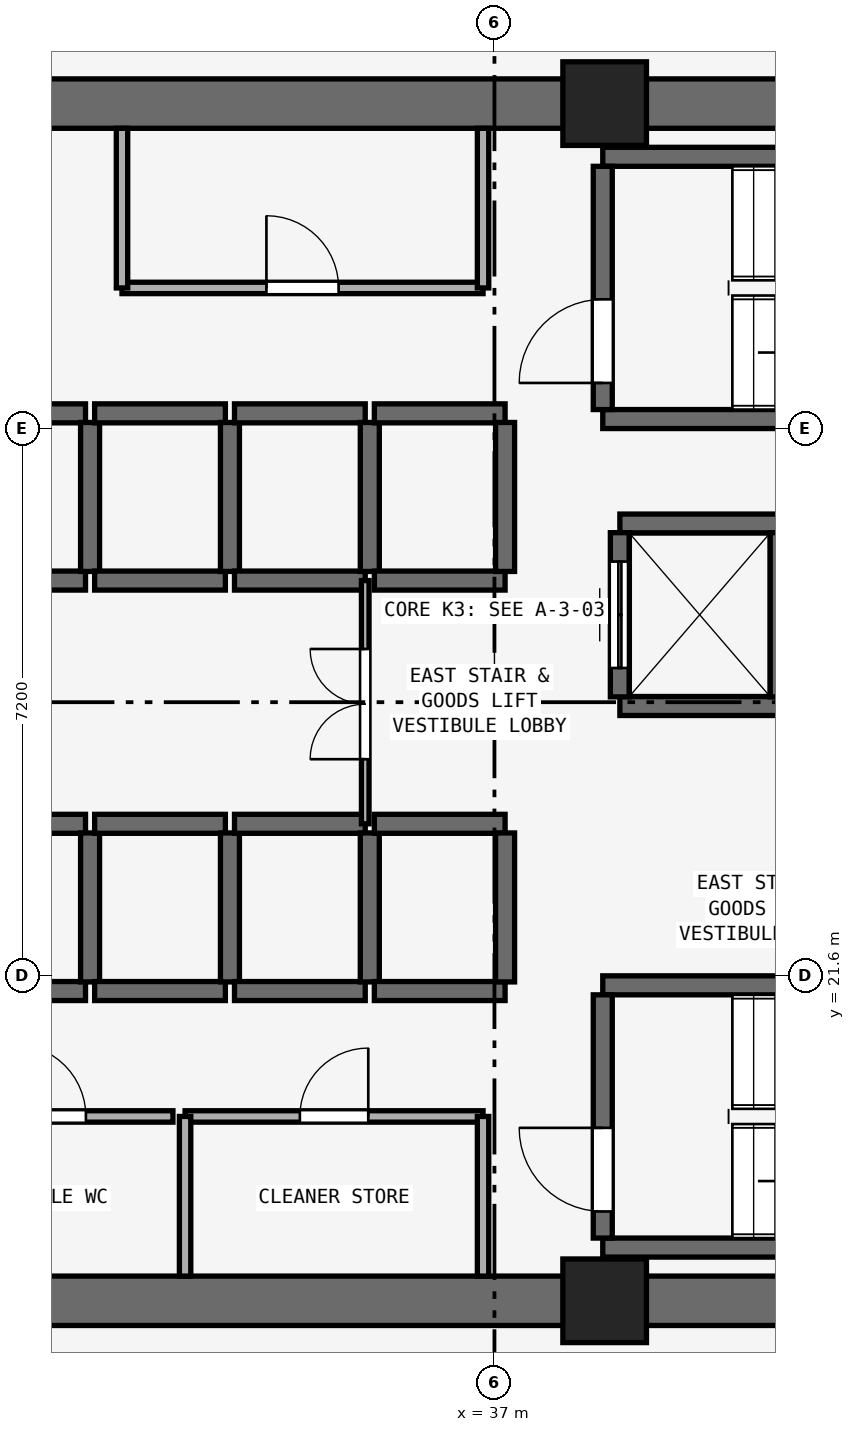
"""IFC4 building model, lengths in metres.
Left out: names, types, materials, properties, quantities, classifications, styles, units other than length and angle.
Written with IfcOpenShell. Run it as: python <this file> out.ifc"""

import sys

from ifc_helpers import new_model, si_unit, direction, frame, frame_2d, origin, origin_2d, place, context, subcontext, project, spatial, rectangle, extrude, element, fill, save


model = new_model("IFC4")
c1 = context("Model", 3, precision=1e-05, world=origin(), true_north=direction((0.0, 1.0)))
c2 = subcontext(c1, "Body", "Model", "MODEL_VIEW")
j1 = project(units=[si_unit("LENGTHUNIT", "METRE"), si_unit("PLANEANGLEUNIT", "RADIAN")], contexts=[c1])
p1 = place(None, origin())
s1 = spatial("IfcSite", under=j1, at=p1, CompositionType="ELEMENT")
p2 = place(p1, origin())
s2 = spatial("IfcBuilding", under=s1, at=p2, CompositionType="ELEMENT")
p3 = place(p2, frame((0.0, 0.0, 25.0)))
s3 = spatial("IfcBuildingStorey", under=s2, at=p3, CompositionType="ELEMENT", Elevation=25.0)
for number, where, z_axis, x_axis in (
    (1, (25.4, 17.325, 0.0), (0.0, 0.0, 1.0), (1.0, 0.0, 0.0)),
    (2, (25.4, 33.075, 0.0), (0.0, 0.0, 1.0), (1.0, 0.0, 0.0)),
):
    element("IfcWall", number, at=place(p3, frame(where, z_axis=z_axis, x_axis=x_axis)), inside=s3, PredefinedType="SHEAR", context=c2, shape_type="SweptSolid", body=[
        extrude(rectangle(XDim=23.2, YDim=0.65, at=frame_2d((11.6, 0.0))), origin(), (0.0, 0.0, 1.0), 3.525),
    ])
for number, where, z_axis, x_axis in (
    (3, (38.45, 17.325, 0.0), (0.0, 0.0, 1.0), (1.0, 0.0, 0.0)),
    (4, (38.45, 33.075, 0.0), (0.0, 0.0, 1.0), (1.0, 0.0, 0.0)),
):
    element("IfcColumn", number, at=place(p3, frame(where, z_axis=z_axis, x_axis=x_axis)), inside=s3, PredefinedType="PILASTER", context=c2, shape_type="SweptSolid", body=[
        extrude(rectangle(XDim=1.1, YDim=1.1, at=origin_2d()), origin(), (0.0, 0.0, 1.0), 3.8),
    ])
for number, where, z_axis, x_axis in (
    (5, (38.425, 28.925, 0.0), (0.0, 0.0, 1.0), (1.0, 0.0, 0.0)),
    (6, (38.425, 32.375, 0.0), (0.0, 0.0, 1.0), (1.0, 0.0, 0.0)),
):
    element("IfcWall", number, at=place(p3, frame(where, z_axis=z_axis, x_axis=x_axis)), inside=s3, PredefinedType="SHEAR", context=c2, shape_type="SweptSolid", body=[
        extrude(rectangle(XDim=7.3, YDim=0.25, at=frame_2d((3.65, 0.0))), origin(), (0.0, 0.0, 1.0), 3.525),
    ])
p4 = place(p3, frame((38.425, 29.05, 0.0), z_axis=(0.0, 0.0, 1.0), x_axis=(0.0, 1.0, 0.0)))
e7 = element("IfcWall", 7, at=p4, inside=s3, PredefinedType="SHEAR", context=c2, shape_type="SweptSolid", body=[
    extrude(rectangle(XDim=3.2, YDim=0.25, at=frame_2d((1.6, 0.0))), origin(), (0.0, 0.0, 1.0), 3.525),
])
p5 = place(p4, frame((0.35, 0.0, 0.0)))
e8 = element("IfcOpeningElement", 8, at=p5, cuts=e7, PredefinedType="OPENING", context=c2, shape_type="SweptSolid", body=[
    extrude(rectangle(XDim=1.1, YDim=2.15, at=frame_2d((0.55, 1.075))), frame((0.0, 0.135, 0.0), z_axis=(0.0, -1.0, 0.0), x_axis=(1.0, 0.0, 0.0)), (0.0, 0.0, 1.0), 0.27),
])
for number, where, z_axis, x_axis in (
    (9, (38.425, 18.025, 0.0), (0.0, 0.0, 1.0), (1.0, 0.0, 0.0)),
    (10, (38.425, 21.475, 0.0), (0.0, 0.0, 1.0), (1.0, 0.0, 0.0)),
):
    element("IfcWall", number, at=place(p3, frame(where, z_axis=z_axis, x_axis=x_axis)), inside=s3, PredefinedType="SHEAR", context=c2, shape_type="SweptSolid", body=[
        extrude(rectangle(XDim=7.3, YDim=0.25, at=frame_2d((3.65, 0.0))), origin(), (0.0, 0.0, 1.0), 3.525),
    ])
p6 = place(p3, frame((38.425, 18.15, 0.0), z_axis=(0.0, 0.0, 1.0), x_axis=(0.0, 1.0, 0.0)))
e11 = element("IfcWall", 11, at=p6, inside=s3, PredefinedType="SHEAR", context=c2, shape_type="SweptSolid", body=[
    extrude(rectangle(XDim=3.2, YDim=0.25, at=frame_2d((1.6, 0.0))), origin(), (0.0, 0.0, 1.0), 3.525),
])
p7 = place(p6, frame((0.35, 0.0, 0.0)))
e12 = element("IfcOpeningElement", 12, at=p7, cuts=e11, PredefinedType="OPENING", context=c2, shape_type="SweptSolid", body=[
    extrude(rectangle(XDim=1.1, YDim=2.15, at=frame_2d((0.55, 1.075))), frame((0.0, 0.135, 0.0), z_axis=(0.0, -1.0, 0.0), x_axis=(1.0, 0.0, 0.0)), (0.0, 0.0, 1.0), 0.27),
])
for number, where, z_axis, x_axis in (
    (13, (29.9, 21.4, 0.0), (0.0, 0.0, 1.0), (1.0, 0.0, 0.0)),
    (14, (29.9, 23.6, 0.0), (0.0, 0.0, 1.0), (1.0, 0.0, 0.0)),
):
    element("IfcWall", number, at=place(p3, frame(where, z_axis=z_axis, x_axis=x_axis)), inside=s3, PredefinedType="SHEAR", context=c2, shape_type="SweptSolid", body=[
        extrude(rectangle(XDim=1.72, YDim=0.25, at=frame_2d((0.86, 0.0))), origin(), (0.0, 0.0, 1.0), 3.525),
    ])
p8 = place(p3, frame((31.68, 21.52, 0.0), z_axis=(0.0, 0.0, 1.0), x_axis=(0.0, 1.0, 0.0)))
e15 = element("IfcWall", 15, at=p8, inside=s3, PredefinedType="SHEAR", context=c2, shape_type="SweptSolid", body=[
    extrude(rectangle(XDim=1.96, YDim=0.25, at=frame_2d((0.98, 0.0))), origin(), (0.0, 0.0, 1.0), 3.525),
])
for number, where, z_axis, x_axis in (
    (16, (31.74, 21.4, 0.0), (0.0, 0.0, 1.0), (1.0, 0.0, 0.0)),
    (17, (31.74, 23.6, 0.0), (0.0, 0.0, 1.0), (1.0, 0.0, 0.0)),
):
    element("IfcWall", number, at=place(p3, frame(where, z_axis=z_axis, x_axis=x_axis)), inside=s3, PredefinedType="SHEAR", context=c2, shape_type="SweptSolid", body=[
        extrude(rectangle(XDim=1.72, YDim=0.25, at=frame_2d((0.86, 0.0))), origin(), (0.0, 0.0, 1.0), 3.525),
    ])
p9 = place(p3, frame((33.52, 21.52, 0.0), z_axis=(0.0, 0.0, 1.0), x_axis=(0.0, 1.0, 0.0)))
e18 = element("IfcWall", 18, at=p9, inside=s3, PredefinedType="SHEAR", context=c2, shape_type="SweptSolid", body=[
    extrude(rectangle(XDim=1.96, YDim=0.25, at=frame_2d((0.98, 0.0))), origin(), (0.0, 0.0, 1.0), 3.525),
])
for number, where, z_axis, x_axis in (
    (19, (33.58, 21.4, 0.0), (0.0, 0.0, 1.0), (1.0, 0.0, 0.0)),
    (20, (33.58, 23.6, 0.0), (0.0, 0.0, 1.0), (1.0, 0.0, 0.0)),
):
    element("IfcWall", number, at=place(p3, frame(where, z_axis=z_axis, x_axis=x_axis)), inside=s3, PredefinedType="SHEAR", context=c2, shape_type="SweptSolid", body=[
        extrude(rectangle(XDim=1.72, YDim=0.25, at=frame_2d((0.86, 0.0))), origin(), (0.0, 0.0, 1.0), 3.525),
    ])
p10 = place(p3, frame((35.36, 21.52, 0.0), z_axis=(0.0, 0.0, 1.0), x_axis=(0.0, 1.0, 0.0)))
e21 = element("IfcWall", 21, at=p10, inside=s3, PredefinedType="SHEAR", context=c2, shape_type="SweptSolid", body=[
    extrude(rectangle(XDim=1.96, YDim=0.25, at=frame_2d((0.98, 0.0))), origin(), (0.0, 0.0, 1.0), 3.525),
])
for number, where, z_axis, x_axis in (
    (22, (35.42, 21.4, 0.0), (0.0, 0.0, 1.0), (1.0, 0.0, 0.0)),
    (23, (35.42, 23.6, 0.0), (0.0, 0.0, 1.0), (1.0, 0.0, 0.0)),
):
    element("IfcWall", number, at=place(p3, frame(where, z_axis=z_axis, x_axis=x_axis)), inside=s3, PredefinedType="SHEAR", context=c2, shape_type="SweptSolid", body=[
        extrude(rectangle(XDim=1.72, YDim=0.25, at=frame_2d((0.86, 0.0))), origin(), (0.0, 0.0, 1.0), 3.525),
    ])
p11 = place(p3, frame((37.14, 21.52, 0.0), z_axis=(0.0, 0.0, 1.0), x_axis=(0.0, 1.0, 0.0)))
e24 = element("IfcWall", 24, at=p11, inside=s3, PredefinedType="SHEAR", context=c2, shape_type="SweptSolid", body=[
    extrude(rectangle(XDim=1.96, YDim=0.25, at=frame_2d((0.98, 0.0))), origin(), (0.0, 0.0, 1.0), 3.525),
])
for number, where, z_axis, x_axis in (
    (25, (29.9, 26.8, 0.0), (0.0, 0.0, 1.0), (1.0, 0.0, 0.0)),
    (26, (29.9, 29.0, 0.0), (0.0, 0.0, 1.0), (1.0, 0.0, 0.0)),
):
    element("IfcWall", number, at=place(p3, frame(where, z_axis=z_axis, x_axis=x_axis)), inside=s3, PredefinedType="SHEAR", context=c2, shape_type="SweptSolid", body=[
        extrude(rectangle(XDim=1.72, YDim=0.25, at=frame_2d((0.86, 0.0))), origin(), (0.0, 0.0, 1.0), 3.525),
    ])
p12 = place(p3, frame((31.68, 26.92, 0.0), z_axis=(0.0, 0.0, 1.0), x_axis=(0.0, 1.0, 0.0)))
e27 = element("IfcWall", 27, at=p12, inside=s3, PredefinedType="SHEAR", context=c2, shape_type="SweptSolid", body=[
    extrude(rectangle(XDim=1.96, YDim=0.25, at=frame_2d((0.98, 0.0))), origin(), (0.0, 0.0, 1.0), 3.525),
])
for number, where, z_axis, x_axis in (
    (28, (31.74, 26.8, 0.0), (0.0, 0.0, 1.0), (1.0, 0.0, 0.0)),
    (29, (31.74, 29.0, 0.0), (0.0, 0.0, 1.0), (1.0, 0.0, 0.0)),
):
    element("IfcWall", number, at=place(p3, frame(where, z_axis=z_axis, x_axis=x_axis)), inside=s3, PredefinedType="SHEAR", context=c2, shape_type="SweptSolid", body=[
        extrude(rectangle(XDim=1.72, YDim=0.25, at=frame_2d((0.86, 0.0))), origin(), (0.0, 0.0, 1.0), 3.525),
    ])
p13 = place(p3, frame((33.52, 26.92, 0.0), z_axis=(0.0, 0.0, 1.0), x_axis=(0.0, 1.0, 0.0)))
e30 = element("IfcWall", 30, at=p13, inside=s3, PredefinedType="SHEAR", context=c2, shape_type="SweptSolid", body=[
    extrude(rectangle(XDim=1.96, YDim=0.25, at=frame_2d((0.98, 0.0))), origin(), (0.0, 0.0, 1.0), 3.525),
])
for number, where, z_axis, x_axis in (
    (31, (33.58, 26.8, 0.0), (0.0, 0.0, 1.0), (1.0, 0.0, 0.0)),
    (32, (33.58, 29.0, 0.0), (0.0, 0.0, 1.0), (1.0, 0.0, 0.0)),
):
    element("IfcWall", number, at=place(p3, frame(where, z_axis=z_axis, x_axis=x_axis)), inside=s3, PredefinedType="SHEAR", context=c2, shape_type="SweptSolid", body=[
        extrude(rectangle(XDim=1.72, YDim=0.25, at=frame_2d((0.86, 0.0))), origin(), (0.0, 0.0, 1.0), 3.525),
    ])
p14 = place(p3, frame((35.36, 26.92, 0.0), z_axis=(0.0, 0.0, 1.0), x_axis=(0.0, 1.0, 0.0)))
e33 = element("IfcWall", 33, at=p14, inside=s3, PredefinedType="SHEAR", context=c2, shape_type="SweptSolid", body=[
    extrude(rectangle(XDim=1.96, YDim=0.25, at=frame_2d((0.98, 0.0))), origin(), (0.0, 0.0, 1.0), 3.525),
])
for number, where, z_axis, x_axis in (
    (34, (35.42, 26.8, 0.0), (0.0, 0.0, 1.0), (1.0, 0.0, 0.0)),
    (35, (35.42, 29.0, 0.0), (0.0, 0.0, 1.0), (1.0, 0.0, 0.0)),
):
    element("IfcWall", number, at=place(p3, frame(where, z_axis=z_axis, x_axis=x_axis)), inside=s3, PredefinedType="SHEAR", context=c2, shape_type="SweptSolid", body=[
        extrude(rectangle(XDim=1.72, YDim=0.25, at=frame_2d((0.86, 0.0))), origin(), (0.0, 0.0, 1.0), 3.525),
    ])
p15 = place(p3, frame((37.14, 26.92, 0.0), z_axis=(0.0, 0.0, 1.0), x_axis=(0.0, 1.0, 0.0)))
e36 = element("IfcWall", 36, at=p15, inside=s3, PredefinedType="SHEAR", context=c2, shape_type="SweptSolid", body=[
    extrude(rectangle(XDim=1.96, YDim=0.25, at=frame_2d((0.98, 0.0))), origin(), (0.0, 0.0, 1.0), 3.525),
])
for number, where, z_axis, x_axis in (
    (37, (38.65, 25.15, 0.0), (0.0, 0.0, 1.0), (1.0, 0.0, 0.0)),
    (38, (38.65, 27.55, 0.0), (0.0, 0.0, 1.0), (1.0, 0.0, 0.0)),
):
    element("IfcWall", number, at=place(p3, frame(where, z_axis=z_axis, x_axis=x_axis)), inside=s3, PredefinedType="SHEAR", context=c2, shape_type="SweptSolid", body=[
        extrude(rectangle(XDim=2.1, YDim=0.25, at=frame_2d((1.05, 0.0))), origin(), (0.0, 0.0, 1.0), 3.525),
    ])
p16 = place(p3, frame((38.65, 25.27, 0.0), z_axis=(0.0, 0.0, 1.0), x_axis=(0.0, 1.0, 0.0)))
e39 = element("IfcWall", 39, at=p16, inside=s3, PredefinedType="SHEAR", context=c2, shape_type="SweptSolid", body=[
    extrude(rectangle(XDim=2.16, YDim=0.25, at=frame_2d((1.08, 0.0))), origin(), (0.0, 0.0, 1.0), 3.525),
])
p17 = place(p16, frame((0.38, 0.0, 0.0)))
e40 = element("IfcOpeningElement", 40, at=p17, cuts=e39, PredefinedType="OPENING", context=c2, shape_type="SweptSolid", body=[
    extrude(rectangle(XDim=1.4, YDim=2.2, at=frame_2d((0.7, 1.1))), frame((0.0, 0.135, 0.0), z_axis=(0.0, -1.0, 0.0), x_axis=(1.0, 0.0, 0.0)), (0.0, 0.0, 1.0), 0.27),
])
p18 = place(p3, frame((40.75, 25.27, 0.0), z_axis=(0.0, 0.0, 1.0), x_axis=(0.0, 1.0, 0.0)))
e41 = element("IfcWall", 41, at=p18, inside=s3, PredefinedType="SHEAR", context=c2, shape_type="SweptSolid", body=[
    extrude(rectangle(XDim=2.16, YDim=0.25, at=frame_2d((1.08, 0.0))), origin(), (0.0, 0.0, 1.0), 3.525),
])
p19 = place(p3, frame((32.1, 30.65, 0.0), z_axis=(0.0, 0.0, 1.0), x_axis=(1.0, 0.0, 0.0)))
e42 = element("IfcWall", 42, at=p19, inside=s3, PredefinedType="PARTITIONING", context=c2, shape_type="SweptSolid", body=[
    extrude(rectangle(XDim=4.75, YDim=0.15, at=frame_2d((2.375, 0.0))), origin(), (0.0, 0.0, 1.0), 3.525),
])
p20 = place(p19, frame((1.9, 0.0, 0.0)))
e43 = element("IfcOpeningElement", 43, at=p20, cuts=e42, PredefinedType="OPENING", context=c2, shape_type="SweptSolid", body=[
    extrude(rectangle(XDim=0.95, YDim=2.1, at=frame_2d((0.475, 1.05))), frame((0.0, 0.085, 0.0), z_axis=(0.0, -1.0, 0.0), x_axis=(1.0, 0.0, 0.0)), (0.0, 0.0, 1.0), 0.17),
])
for number, where, z_axis, x_axis in (
    (44, (32.1, 30.65, 0.0), (0.0, 0.0, 1.0), (0.0, 1.0, 0.0)),
    (45, (36.85, 30.65, 0.0), (0.0, 0.0, 1.0), (0.0, 1.0, 0.0)),
):
    element("IfcWall", number, at=place(p3, frame(where, z_axis=z_axis, x_axis=x_axis)), inside=s3, PredefinedType="PARTITIONING", context=c2, shape_type="SweptSolid", body=[
        extrude(rectangle(XDim=2.1, YDim=0.15, at=frame_2d((1.05, 0.0))), origin(), (0.0, 0.0, 1.0), 3.525),
    ])
p21 = place(p3, frame((29.53, 19.75, 0.0), z_axis=(0.0, 0.0, 1.0), x_axis=(1.0, 0.0, 0.0)))
e46 = element("IfcWall", 46, at=p21, inside=s3, PredefinedType="PARTITIONING", context=c2, shape_type="SweptSolid", body=[
    extrude(rectangle(XDim=3.24, YDim=0.15, at=frame_2d((1.62, 0.0))), origin(), (0.0, 0.0, 1.0), 3.525),
])
p22 = place(p21, frame((1.145, 0.0, 0.0)))
e47 = element("IfcOpeningElement", 47, at=p22, cuts=e46, PredefinedType="OPENING", context=c2, shape_type="SweptSolid", body=[
    extrude(rectangle(XDim=0.95, YDim=2.1, at=frame_2d((0.475, 1.05))), frame((0.0, 0.085, 0.0), z_axis=(0.0, -1.0, 0.0), x_axis=(1.0, 0.0, 0.0)), (0.0, 0.0, 1.0), 0.17),
])
p23 = place(p3, frame((32.93, 19.75, 0.0), z_axis=(0.0, 0.0, 1.0), x_axis=(1.0, 0.0, 0.0)))
e48 = element("IfcWall", 48, at=p23, inside=s3, PredefinedType="PARTITIONING", context=c2, shape_type="SweptSolid", body=[
    extrude(rectangle(XDim=3.92, YDim=0.15, at=frame_2d((1.96, 0.0))), origin(), (0.0, 0.0, 1.0), 3.525),
])
p24 = place(p23, frame((1.51, 0.0, 0.0)))
e49 = element("IfcOpeningElement", 49, at=p24, cuts=e48, PredefinedType="OPENING", context=c2, shape_type="SweptSolid", body=[
    extrude(rectangle(XDim=0.9, YDim=2.1, at=frame_2d((0.45, 1.05))), frame((0.0, 0.085, 0.0), z_axis=(0.0, -1.0, 0.0), x_axis=(1.0, 0.0, 0.0)), (0.0, 0.0, 1.0), 0.17),
])
for number, where, z_axis, x_axis in (
    (50, (32.93, 17.65, 0.0), (0.0, 0.0, 1.0), (0.0, 1.0, 0.0)),
    (51, (36.85, 17.65, 0.0), (0.0, 0.0, 1.0), (0.0, 1.0, 0.0)),
):
    element("IfcWall", number, at=place(p3, frame(where, z_axis=z_axis, x_axis=x_axis)), inside=s3, PredefinedType="PARTITIONING", context=c2, shape_type="SweptSolid", body=[
        extrude(rectangle(XDim=2.1, YDim=0.15, at=frame_2d((1.05, 0.0))), origin(), (0.0, 0.0, 1.0), 3.525),
    ])
p25 = place(p3, frame((35.3, 23.6, 0.0), z_axis=(0.0, 0.0, 1.0), x_axis=(0.0, 1.0, 0.0)))
e52 = element("IfcWall", 52, at=p25, inside=s3, PredefinedType="PARTITIONING", context=c2, shape_type="SweptSolid", body=[
    extrude(rectangle(XDim=3.2, YDim=0.1, at=frame_2d((1.6, 0.0))), origin(), (0.0, 0.0, 1.0), 3.525),
])
p26 = place(p25, frame((0.85, 0.0, 0.0)))
e53 = element("IfcOpeningElement", 53, at=p26, cuts=e52, PredefinedType="OPENING", context=c2, shape_type="SweptSolid", body=[
    extrude(rectangle(XDim=1.45, YDim=2.12, at=frame_2d((0.725, 1.06))), frame((0.0, 0.06, 0.0), z_axis=(0.0, -1.0, 0.0), x_axis=(1.0, 0.0, 0.0)), (0.0, 0.0, 1.0), 0.12),
])
p27 = place(p5, origin())
e54 = element("IfcDoor", 54, at=p27, inside=s3, OperationType="SINGLE_SWING_LEFT", PredefinedType="DOOR", context=c2, shape_type="SweptSolid", body=[
    extrude(rectangle(XDim=1.1, YDim=2.15, at=frame_2d((0.55, 1.075))), frame((0.0, 0.025, 0.0), z_axis=(0.0, -1.0, 0.0), x_axis=(1.0, 0.0, 0.0)), (0.0, 0.0, 1.0), 0.05),
])
fill(e8, e54)
p28 = place(p7, origin())
e55 = element("IfcDoor", 55, at=p28, inside=s3, OperationType="SINGLE_SWING_RIGHT", PredefinedType="DOOR", context=c2, shape_type="SweptSolid", body=[
    extrude(rectangle(XDim=1.1, YDim=2.15, at=frame_2d((0.55, 1.075))), frame((0.0, 0.025, 0.0), z_axis=(0.0, -1.0, 0.0), x_axis=(1.0, 0.0, 0.0)), (0.0, 0.0, 1.0), 0.05),
])
fill(e12, e55)
p29 = place(p17, origin())
e56 = element("IfcDoor", 56, at=p29, inside=s3, OperationType="DOUBLE_DOOR_SLIDING", PredefinedType="DOOR", context=c2, shape_type="SweptSolid", body=[
    extrude(rectangle(XDim=1.4, YDim=2.2, at=frame_2d((0.7, 1.1))), frame((0.0, 0.025, 0.0), z_axis=(0.0, -1.0, 0.0), x_axis=(1.0, 0.0, 0.0)), (0.0, 0.0, 1.0), 0.05),
])
fill(e40, e56)
p30 = place(p20, origin())
e57 = element("IfcDoor", 57, at=p30, inside=s3, OperationType="SINGLE_SWING_LEFT", PredefinedType="DOOR", context=c2, shape_type="SweptSolid", body=[
    extrude(rectangle(XDim=0.95, YDim=2.1, at=frame_2d((0.475, 1.05))), frame((0.0, 0.025, 0.0), z_axis=(0.0, -1.0, 0.0), x_axis=(1.0, 0.0, 0.0)), (0.0, 0.0, 1.0), 0.05),
])
fill(e43, e57)
p31 = place(p22, origin())
e58 = element("IfcDoor", 58, at=p31, inside=s3, OperationType="SINGLE_SWING_LEFT", PredefinedType="DOOR", context=c2, shape_type="SweptSolid", body=[
    extrude(rectangle(XDim=0.95, YDim=2.1, at=frame_2d((0.475, 1.05))), frame((0.0, 0.025, 0.0), z_axis=(0.0, -1.0, 0.0), x_axis=(1.0, 0.0, 0.0)), (0.0, 0.0, 1.0), 0.05),
])
fill(e47, e58)
p32 = place(p24, origin())
e59 = element("IfcDoor", 59, at=p32, inside=s3, OperationType="SINGLE_SWING_RIGHT", PredefinedType="DOOR", context=c2, shape_type="SweptSolid", body=[
    extrude(rectangle(XDim=0.9, YDim=2.1, at=frame_2d((0.45, 1.05))), frame((0.0, 0.025, 0.0), z_axis=(0.0, -1.0, 0.0), x_axis=(1.0, 0.0, 0.0)), (0.0, 0.0, 1.0), 0.05),
])
fill(e49, e59)
p33 = place(p26, origin())
e60 = element("IfcDoor", 60, at=p33, inside=s3, OperationType="DOUBLE_DOOR_SINGLE_SWING", PredefinedType="DOOR", context=c2, shape_type="SweptSolid", body=[
    extrude(rectangle(XDim=1.45, YDim=2.12, at=frame_2d((0.725, 1.06))), frame((0.0, 0.025, 0.0), z_axis=(0.0, -1.0, 0.0), x_axis=(1.0, 0.0, 0.0)), (0.0, 0.0, 1.0), 0.05),
])
fill(e53, e60)
save(model, sys.argv[1])
